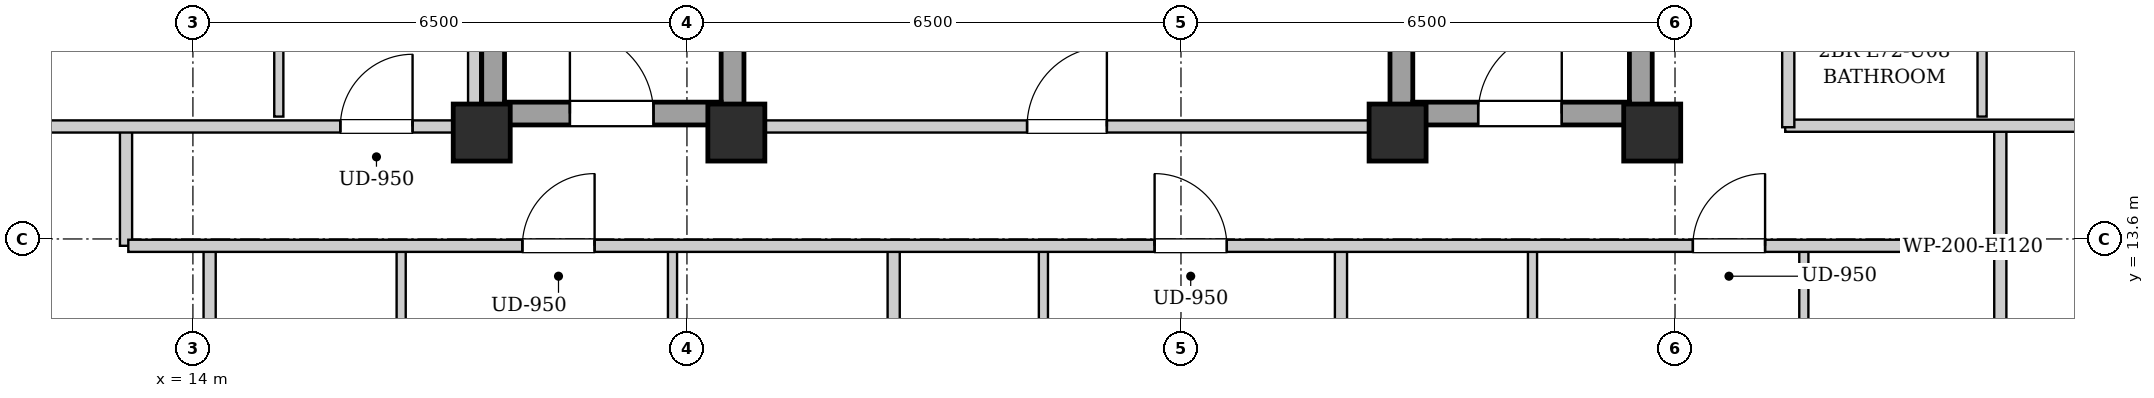
"""IFC4 building model, lengths in metres.
Left out: names, types, materials, properties, quantities, classifications, styles, units other than length and angle.
Written with IfcOpenShell. Run it as: python <this file> out.ifc"""

import sys

from ifc_helpers import new_model, si_unit, direction, frame, frame_2d, origin, origin_2d, place, context, subcontext, project, spatial, rectangle, extrude, element, fill, save


model = new_model("IFC4")
c1 = context("Model", 3, precision=1e-05, world=origin(), true_north=direction((0.0, 1.0)))
c2 = subcontext(c1, "Body", "Model", "MODEL_VIEW")
j1 = project(units=[si_unit("LENGTHUNIT", "METRE"), si_unit("PLANEANGLEUNIT", "RADIAN")], contexts=[c1])
p1 = place(None, origin())
s1 = spatial("IfcSite", under=j1, at=p1, CompositionType="ELEMENT")
p2 = place(p1, origin())
s2 = spatial("IfcBuilding", under=s1, at=p2, CompositionType="ELEMENT")
p3 = place(p2, frame((0.0, 0.0, 247.9)))
s3 = spatial("IfcBuildingStorey", under=s2, at=p3, CompositionType="ELEMENT", Elevation=247.9)
for number, where, z_axis, x_axis in (
    (1, (17.8, 15.0, 0.0), (0.0, 0.0, 1.0), (1.0, 0.0, 0.0)),
    (2, (21.15, 15.0, 0.0), (0.0, 0.0, 1.0), (1.0, 0.0, 0.0)),
    (3, (29.85, 15.0, 0.0), (0.0, 0.0, 1.0), (1.0, 0.0, 0.0)),
    (4, (33.2, 15.0, 0.0), (0.0, 0.0, 1.0), (1.0, 0.0, 0.0)),
):
    element("IfcColumn", number, at=place(p3, frame(where, z_axis=z_axis, x_axis=x_axis)), inside=s3, PredefinedType="COLUMN", context=c2, shape_type="SweptSolid", body=[
        extrude(rectangle(XDim=0.75, YDim=0.75, at=origin_2d()), origin(), (0.0, 0.0, 1.0), 3.4),
    ])
for number, where, z_axis, x_axis in (
    (5, (17.95, 15.1, 0.0), (0.0, 0.0, 1.0), (0.0, 1.0, 0.0)),
    (6, (21.1, 15.1, 0.0), (0.0, 0.0, 1.0), (0.0, 1.0, 0.0)),
):
    element("IfcWall", number, at=place(p3, frame(where, z_axis=z_axis, x_axis=x_axis)), inside=s3, PredefinedType="SHEAR", context=c2, shape_type="SweptSolid", body=[
        extrude(rectangle(XDim=9.0, YDim=0.3, at=frame_2d((4.5, 0.0))), origin(), (0.0, 0.0, 1.0), 3.14),
    ])
p4 = place(p3, frame((18.1, 15.25, 0.0), z_axis=(0.0, 0.0, 1.0), x_axis=(1.0, 0.0, 0.0)))
e7 = element("IfcWall", 7, at=p4, inside=s3, PredefinedType="SHEAR", context=c2, shape_type="SweptSolid", body=[
    extrude(rectangle(XDim=2.85, YDim=0.3, at=frame_2d((1.425, 0.0))), origin(), (0.0, 0.0, 1.0), 3.14),
])
p5 = place(p4, frame((0.86, 0.0, 0.0)))
e8 = element("IfcOpeningElement", 8, at=p5, cuts=e7, PredefinedType="OPENING", context=c2, shape_type="SweptSolid", body=[
    extrude(rectangle(XDim=1.1, YDim=2.05, at=frame_2d((0.55, 1.025))), frame((0.0, 0.16, 0.0), z_axis=(0.0, -1.0, 0.0), x_axis=(1.0, 0.0, 0.0)), (0.0, 0.0, 1.0), 0.32),
])
for number, where, z_axis, x_axis in (
    (9, (29.9, 15.1, 0.0), (0.0, 0.0, 1.0), (0.0, 1.0, 0.0)),
    (10, (33.05, 15.1, 0.0), (0.0, 0.0, 1.0), (0.0, 1.0, 0.0)),
):
    element("IfcWall", number, at=place(p3, frame(where, z_axis=z_axis, x_axis=x_axis)), inside=s3, PredefinedType="SHEAR", context=c2, shape_type="SweptSolid", body=[
        extrude(rectangle(XDim=9.0, YDim=0.3, at=frame_2d((4.5, 0.0))), origin(), (0.0, 0.0, 1.0), 3.14),
    ])
p6 = place(p3, frame((30.05, 15.25, 0.0), z_axis=(0.0, 0.0, 1.0), x_axis=(1.0, 0.0, 0.0)))
e11 = element("IfcWall", 11, at=p6, inside=s3, PredefinedType="SHEAR", context=c2, shape_type="SweptSolid", body=[
    extrude(rectangle(XDim=2.85, YDim=0.3, at=frame_2d((1.425, 0.0))), origin(), (0.0, 0.0, 1.0), 3.14),
])
p7 = place(p6, frame((0.86, 0.0, 0.0)))
e12 = element("IfcOpeningElement", 12, at=p7, cuts=e11, PredefinedType="OPENING", context=c2, shape_type="SweptSolid", body=[
    extrude(rectangle(XDim=1.1, YDim=2.05, at=frame_2d((0.55, 1.025))), frame((0.0, 0.16, 0.0), z_axis=(0.0, -1.0, 0.0), x_axis=(1.0, 0.0, 0.0)), (0.0, 0.0, 1.0), 0.32),
])
p8 = place(p3, frame((21.25, 15.08, 0.0), z_axis=(0.0, 0.0, 1.0), x_axis=(1.0, 0.0, 0.0)))
e13 = element("IfcWall", 13, at=p8, inside=s3, PredefinedType="PARTITIONING", context=c2, shape_type="SweptSolid", body=[
    extrude(rectangle(XDim=8.5, YDim=0.16, at=frame_2d((4.25, 0.0))), origin(), (0.0, 0.0, 1.0), 2.668),
])
p9 = place(p8, frame((3.725, 0.0, 0.0)))
e14 = element("IfcOpeningElement", 14, at=p9, cuts=e13, PredefinedType="OPENING", context=c2, shape_type="SweptSolid", body=[
    extrude(rectangle(XDim=1.05, YDim=2.05, at=frame_2d((0.525, 1.025))), frame((0.0, 0.09, 0.0), z_axis=(0.0, -1.0, 0.0), x_axis=(1.0, 0.0, 0.0)), (0.0, 0.0, 1.0), 0.18),
])
for number, where, z_axis, x_axis in (
    (15, (13.12, 13.51, 0.0), (0.0, 0.0, 1.0), (0.0, 1.0, 0.0)),
    (16, (37.78, 13.51, 0.0), (0.0, 0.0, 1.0), (0.0, 1.0, 0.0)),
):
    element("IfcWall", number, at=place(p3, frame(where, z_axis=z_axis, x_axis=x_axis)), inside=s3, PredefinedType="PARTITIONING", context=c2, shape_type="SweptSolid", body=[
        extrude(rectangle(XDim=1.58, YDim=0.16, at=frame_2d((0.79, 0.0))), origin(), (0.0, 0.0, 1.0), 3.14),
    ])
p10 = place(p3, frame((34.95, 15.09, 0.0), z_axis=(0.0, 0.0, 1.0), x_axis=(1.0, 0.0, 0.0)))
e17 = element("IfcWall", 17, at=p10, inside=s3, PredefinedType="PARTITIONING", context=c2, shape_type="SweptSolid", body=[
    extrude(rectangle(XDim=5.07, YDim=0.16, at=frame_2d((2.535, 0.0))), origin(), (0.0, 0.0, 1.0), 2.668),
])
p11 = place(p3, frame((14.22, 4.08, 0.0), z_axis=(0.0, 0.0, 1.0), x_axis=(0.0, 1.0, 0.0)))
e18 = element("IfcWall", 18, at=p11, inside=s3, PredefinedType="PARTITIONING", context=c2, shape_type="SweptSolid", body=[
    extrude(rectangle(XDim=9.39, YDim=0.16, at=frame_2d((4.695, 0.0))), origin(), (0.0, 0.0, 1.0), 3.14),
])
p12 = place(p3, frame((16.74, 10.62, 0.0), z_axis=(0.0, 0.0, 1.0), x_axis=(0.0, 1.0, 0.0)))
e19 = element("IfcWall", 19, at=p12, inside=s3, PredefinedType="PARTITIONING", context=c2, shape_type="SweptSolid", body=[
    extrude(rectangle(XDim=2.85, YDim=0.12, at=frame_2d((1.425, 0.0))), origin(), (0.0, 0.0, 1.0), 3.14),
])
p13 = place(p12, frame((0.995, 0.0, 0.0)))
e20 = element("IfcOpeningElement", 20, at=p13, cuts=e19, PredefinedType="OPENING", context=c2, shape_type="SweptSolid", body=[
    extrude(rectangle(XDim=0.86, YDim=2.05, at=frame_2d((0.43, 1.025))), frame((0.0, 0.07, 0.0), z_axis=(0.0, -1.0, 0.0), x_axis=(1.0, 0.0, 0.0)), (0.0, 0.0, 1.0), 0.14),
])
p14 = place(p3, frame((20.31, 10.62, 0.0), z_axis=(0.0, 0.0, 1.0), x_axis=(0.0, 1.0, 0.0)))
e21 = element("IfcWall", 21, at=p14, inside=s3, PredefinedType="PARTITIONING", context=c2, shape_type="SweptSolid", body=[
    extrude(rectangle(XDim=2.85, YDim=0.12, at=frame_2d((1.425, 0.0))), origin(), (0.0, 0.0, 1.0), 3.14),
])
p15 = place(p14, frame((0.975, 0.0, 0.0)))
e22 = element("IfcOpeningElement", 22, at=p15, cuts=e21, PredefinedType="OPENING", context=c2, shape_type="SweptSolid", body=[
    extrude(rectangle(XDim=0.9, YDim=2.05, at=frame_2d((0.45, 1.025))), frame((0.0, 0.07, 0.0), z_axis=(0.0, -1.0, 0.0), x_axis=(1.0, 0.0, 0.0)), (0.0, 0.0, 1.0), 0.14),
])
p16 = place(p3, frame((23.22, 4.08, 0.0), z_axis=(0.0, 0.0, 1.0), x_axis=(0.0, 1.0, 0.0)))
e23 = element("IfcWall", 23, at=p16, inside=s3, PredefinedType="PARTITIONING", context=c2, shape_type="SweptSolid", body=[
    extrude(rectangle(XDim=9.39, YDim=0.16, at=frame_2d((4.695, 0.0))), origin(), (0.0, 0.0, 1.0), 3.14),
])
p17 = place(p3, frame((25.19, 10.62, 0.0), z_axis=(0.0, 0.0, 1.0), x_axis=(0.0, 1.0, 0.0)))
e24 = element("IfcWall", 24, at=p17, inside=s3, PredefinedType="PARTITIONING", context=c2, shape_type="SweptSolid", body=[
    extrude(rectangle(XDim=2.85, YDim=0.12, at=frame_2d((1.425, 0.0))), origin(), (0.0, 0.0, 1.0), 3.14),
])
p18 = place(p17, frame((0.995, 0.0, 0.0)))
e25 = element("IfcOpeningElement", 25, at=p18, cuts=e24, PredefinedType="OPENING", context=c2, shape_type="SweptSolid", body=[
    extrude(rectangle(XDim=0.86, YDim=2.05, at=frame_2d((0.43, 1.025))), frame((0.0, 0.07, 0.0), z_axis=(0.0, -1.0, 0.0), x_axis=(1.0, 0.0, 0.0)), (0.0, 0.0, 1.0), 0.14),
])
p19 = place(p3, frame((37.78, 10.56, 0.0), z_axis=(0.0, 0.0, 1.0), x_axis=(0.0, 1.0, 0.0)))
e26 = element("IfcWall", 26, at=p19, inside=s3, PredefinedType="PARTITIONING", context=c2, shape_type="SweptSolid", body=[
    extrude(rectangle(XDim=2.91, YDim=0.16, at=frame_2d((1.455, 0.0))), origin(), (0.0, 0.0, 1.0), 3.14),
])
p20 = place(p3, frame((29.105, 4.08, 0.0), z_axis=(0.0, 0.0, 1.0), x_axis=(0.0, 1.0, 0.0)))
e27 = element("IfcWall", 27, at=p20, inside=s3, PredefinedType="PARTITIONING", context=c2, shape_type="SweptSolid", body=[
    extrude(rectangle(XDim=9.39, YDim=0.16, at=frame_2d((4.695, 0.0))), origin(), (0.0, 0.0, 1.0), 3.14),
])
p21 = place(p3, frame((31.625, 10.62, 0.0), z_axis=(0.0, 0.0, 1.0), x_axis=(0.0, 1.0, 0.0)))
e28 = element("IfcWall", 28, at=p21, inside=s3, PredefinedType="PARTITIONING", context=c2, shape_type="SweptSolid", body=[
    extrude(rectangle(XDim=2.85, YDim=0.12, at=frame_2d((1.425, 0.0))), origin(), (0.0, 0.0, 1.0), 3.14),
])
p22 = place(p21, frame((0.995, 0.0, 0.0)))
e29 = element("IfcOpeningElement", 29, at=p22, cuts=e28, PredefinedType="OPENING", context=c2, shape_type="SweptSolid", body=[
    extrude(rectangle(XDim=0.86, YDim=2.05, at=frame_2d((0.43, 1.025))), frame((0.0, 0.07, 0.0), z_axis=(0.0, -1.0, 0.0), x_axis=(1.0, 0.0, 0.0)), (0.0, 0.0, 1.0), 0.14),
])
p23 = place(p3, frame((35.195, 10.62, 0.0), z_axis=(0.0, 0.0, 1.0), x_axis=(0.0, 1.0, 0.0)))
e30 = element("IfcWall", 30, at=p23, inside=s3, PredefinedType="PARTITIONING", context=c2, shape_type="SweptSolid", body=[
    extrude(rectangle(XDim=2.85, YDim=0.12, at=frame_2d((1.425, 0.0))), origin(), (0.0, 0.0, 1.0), 3.14),
])
p24 = place(p23, frame((0.975, 0.0, 0.0)))
e31 = element("IfcOpeningElement", 31, at=p24, cuts=e30, PredefinedType="OPENING", context=c2, shape_type="SweptSolid", body=[
    extrude(rectangle(XDim=0.9, YDim=2.05, at=frame_2d((0.45, 1.025))), frame((0.0, 0.07, 0.0), z_axis=(0.0, -1.0, 0.0), x_axis=(1.0, 0.0, 0.0)), (0.0, 0.0, 1.0), 0.14),
])
p25 = place(p3, frame((10.88, 15.08, 0.0), z_axis=(0.0, 0.0, 1.0), x_axis=(1.0, 0.0, 0.0)))
e32 = element("IfcWall", 32, at=p25, inside=s3, PredefinedType="PARTITIONING", context=c2, shape_type="SweptSolid", body=[
    extrude(rectangle(XDim=6.88, YDim=0.16, at=frame_2d((3.44, 0.0))), origin(), (0.0, 0.0, 1.0), 2.668),
])
p26 = place(p25, frame((5.06, 0.0, 0.0)))
e33 = element("IfcOpeningElement", 33, at=p26, cuts=e32, PredefinedType="OPENING", context=c2, shape_type="SweptSolid", body=[
    extrude(rectangle(XDim=0.95, YDim=2.1, at=frame_2d((0.475, 1.05))), frame((0.0, 0.09, 0.0), z_axis=(0.0, -1.0, 0.0), x_axis=(1.0, 0.0, 0.0)), (0.0, 0.0, 1.0), 0.18),
])
p27 = place(p3, frame((15.13, 15.21, 0.0), z_axis=(0.0, 0.0, 1.0), x_axis=(0.0, 1.0, 0.0)))
e34 = element("IfcWall", 34, at=p27, inside=s3, PredefinedType="PARTITIONING", context=c2, shape_type="SweptSolid", body=[
    extrude(rectangle(XDim=4.5, YDim=0.12, at=frame_2d((2.25, 0.0))), origin(), (0.0, 0.0, 1.0), 3.14),
])
p28 = place(p27, frame((1.8, 0.0, 0.0)))
e35 = element("IfcOpeningElement", 35, at=p28, cuts=e34, PredefinedType="OPENING", context=c2, shape_type="SweptSolid", body=[
    extrude(rectangle(XDim=0.9, YDim=2.05, at=frame_2d((0.45, 1.025))), frame((0.0, 0.07, 0.0), z_axis=(0.0, -1.0, 0.0), x_axis=(1.0, 0.0, 0.0)), (0.0, 0.0, 1.0), 0.14),
])
p29 = place(p3, frame((37.54, 15.21, 0.0), z_axis=(0.0, 0.0, 1.0), x_axis=(0.0, 1.0, 0.0)))
e36 = element("IfcWall", 36, at=p29, inside=s3, PredefinedType="PARTITIONING", context=c2, shape_type="SweptSolid", body=[
    extrude(rectangle(XDim=2.3, YDim=0.12, at=frame_2d((1.15, 0.0))), origin(), (0.0, 0.0, 1.0), 3.14),
])
p30 = place(p3, frame((13.15, 13.51, 0.0), z_axis=(0.0, 0.0, 1.0), x_axis=(1.0, 0.0, 0.0)))
e37 = element("IfcWall", 37, at=p30, inside=s3, PredefinedType="PARTITIONING", context=c2, shape_type="SweptSolid", body=[
    extrude(rectangle(XDim=24.6, YDim=0.16, at=frame_2d((12.3, 0.0))), origin(), (0.0, 0.0, 1.0), 3.14),
])
p31 = place(p30, frame((5.185, 0.0, 0.0)))
e38 = element("IfcOpeningElement", 38, at=p31, cuts=e37, PredefinedType="OPENING", context=c2, shape_type="SweptSolid", body=[
    extrude(rectangle(XDim=0.95, YDim=2.1, at=frame_2d((0.475, 1.05))), frame((0.0, 0.09, 0.0), z_axis=(0.0, -1.0, 0.0), x_axis=(1.0, 0.0, 0.0)), (0.0, 0.0, 1.0), 0.18),
])
p32 = place(p30, frame((13.503, 0.0, 0.0)))
e39 = element("IfcOpeningElement", 39, at=p32, cuts=e37, PredefinedType="OPENING", context=c2, shape_type="SweptSolid", body=[
    extrude(rectangle(XDim=0.95, YDim=2.1, at=frame_2d((0.475, 1.05))), frame((0.0, 0.09, 0.0), z_axis=(0.0, -1.0, 0.0), x_axis=(1.0, 0.0, 0.0)), (0.0, 0.0, 1.0), 0.18),
])
p33 = place(p30, frame((20.585, 0.0, 0.0)))
e40 = element("IfcOpeningElement", 40, at=p33, cuts=e37, PredefinedType="OPENING", context=c2, shape_type="SweptSolid", body=[
    extrude(rectangle(XDim=0.95, YDim=2.1, at=frame_2d((0.475, 1.05))), frame((0.0, 0.09, 0.0), z_axis=(0.0, -1.0, 0.0), x_axis=(1.0, 0.0, 0.0)), (0.0, 0.0, 1.0), 0.18),
])
p34 = place(p3, frame((17.7, 15.02, 0.0), z_axis=(0.0, 0.0, 1.0), x_axis=(0.0, 1.0, 0.0)))
e41 = element("IfcWall", 41, at=p34, inside=s3, PredefinedType="PARTITIONING", context=c2, shape_type="SweptSolid", body=[
    extrude(rectangle(XDim=13.98, YDim=0.16, at=frame_2d((6.99, 0.0))), origin(), (0.0, 0.0, 1.0), 2.475),
])
p35 = place(p3, frame((34.99, 15.07, 0.0), z_axis=(0.0, 0.0, 1.0), x_axis=(0.0, 1.0, 0.0)))
e42 = element("IfcWall", 42, at=p35, inside=s3, PredefinedType="PARTITIONING", context=c2, shape_type="SweptSolid", body=[
    extrude(rectangle(XDim=13.93, YDim=0.16, at=frame_2d((6.965, 0.0))), origin(), (0.0, 0.0, 1.0), 3.14),
])
p36 = place(p35, frame((4.385, 0.0, 0.0)))
e43 = element("IfcOpeningElement", 43, at=p36, cuts=e42, PredefinedType="OPENING", context=c2, shape_type="SweptSolid", body=[
    extrude(rectangle(XDim=0.95, YDim=2.1, at=frame_2d((0.475, 1.05))), frame((0.0, 0.09, 0.0), z_axis=(0.0, -1.0, 0.0), x_axis=(1.0, 0.0, 0.0)), (0.0, 0.0, 1.0), 0.18),
])
p37 = place(p5, origin())
e44 = element("IfcDoor", 44, at=p37, inside=s3, OperationType="SINGLE_SWING_LEFT", PredefinedType="DOOR", context=c2, shape_type="SweptSolid", body=[
    extrude(rectangle(XDim=1.1, YDim=2.05, at=frame_2d((0.55, 1.025))), frame((0.0, 0.025, 0.0), z_axis=(0.0, -1.0, 0.0), x_axis=(1.0, 0.0, 0.0)), (0.0, 0.0, 1.0), 0.05),
])
fill(e8, e44)
p38 = place(p7, origin())
e45 = element("IfcDoor", 45, at=p38, inside=s3, OperationType="SINGLE_SWING_RIGHT", PredefinedType="DOOR", context=c2, shape_type="SweptSolid", body=[
    extrude(rectangle(XDim=1.1, YDim=2.05, at=frame_2d((0.55, 1.025))), frame((0.0, 0.025, 0.0), z_axis=(0.0, -1.0, 0.0), x_axis=(1.0, 0.0, 0.0)), (0.0, 0.0, 1.0), 0.05),
])
fill(e12, e45)
p39 = place(p9, origin())
e46 = element("IfcDoor", 46, at=p39, inside=s3, OperationType="SINGLE_SWING_RIGHT", PredefinedType="DOOR", context=c2, shape_type="SweptSolid", body=[
    extrude(rectangle(XDim=1.05, YDim=2.05, at=frame_2d((0.525, 1.025))), frame((0.0, 0.025, 0.0), z_axis=(0.0, -1.0, 0.0), x_axis=(1.0, 0.0, 0.0)), (0.0, 0.0, 1.0), 0.05),
])
fill(e14, e46)
p40 = place(p26, origin())
e47 = element("IfcDoor", 47, at=p40, inside=s3, OperationType="SINGLE_SWING_RIGHT", PredefinedType="DOOR", context=c2, shape_type="SweptSolid", body=[
    extrude(rectangle(XDim=0.95, YDim=2.1, at=frame_2d((0.475, 1.05))), frame((0.0, 0.025, 0.0), z_axis=(0.0, -1.0, 0.0), x_axis=(1.0, 0.0, 0.0)), (0.0, 0.0, 1.0), 0.05),
])
fill(e33, e47)
p41 = place(p31, origin())
e48 = element("IfcDoor", 48, at=p41, inside=s3, OperationType="SINGLE_SWING_RIGHT", PredefinedType="DOOR", context=c2, shape_type="SweptSolid", body=[
    extrude(rectangle(XDim=0.95, YDim=2.1, at=frame_2d((0.475, 1.05))), frame((0.0, 0.025, 0.0), z_axis=(0.0, -1.0, 0.0), x_axis=(1.0, 0.0, 0.0)), (0.0, 0.0, 1.0), 0.05),
])
fill(e38, e48)
p42 = place(p32, origin())
e49 = element("IfcDoor", 49, at=p42, inside=s3, OperationType="SINGLE_SWING_LEFT", PredefinedType="DOOR", context=c2, shape_type="SweptSolid", body=[
    extrude(rectangle(XDim=0.95, YDim=2.1, at=frame_2d((0.475, 1.05))), frame((0.0, 0.025, 0.0), z_axis=(0.0, -1.0, 0.0), x_axis=(1.0, 0.0, 0.0)), (0.0, 0.0, 1.0), 0.05),
])
fill(e39, e49)
p43 = place(p33, origin())
e50 = element("IfcDoor", 50, at=p43, inside=s3, OperationType="SINGLE_SWING_RIGHT", PredefinedType="DOOR", context=c2, shape_type="SweptSolid", body=[
    extrude(rectangle(XDim=0.95, YDim=2.1, at=frame_2d((0.475, 1.05))), frame((0.0, 0.025, 0.0), z_axis=(0.0, -1.0, 0.0), x_axis=(1.0, 0.0, 0.0)), (0.0, 0.0, 1.0), 0.05),
])
fill(e40, e50)
save(model, sys.argv[1])
